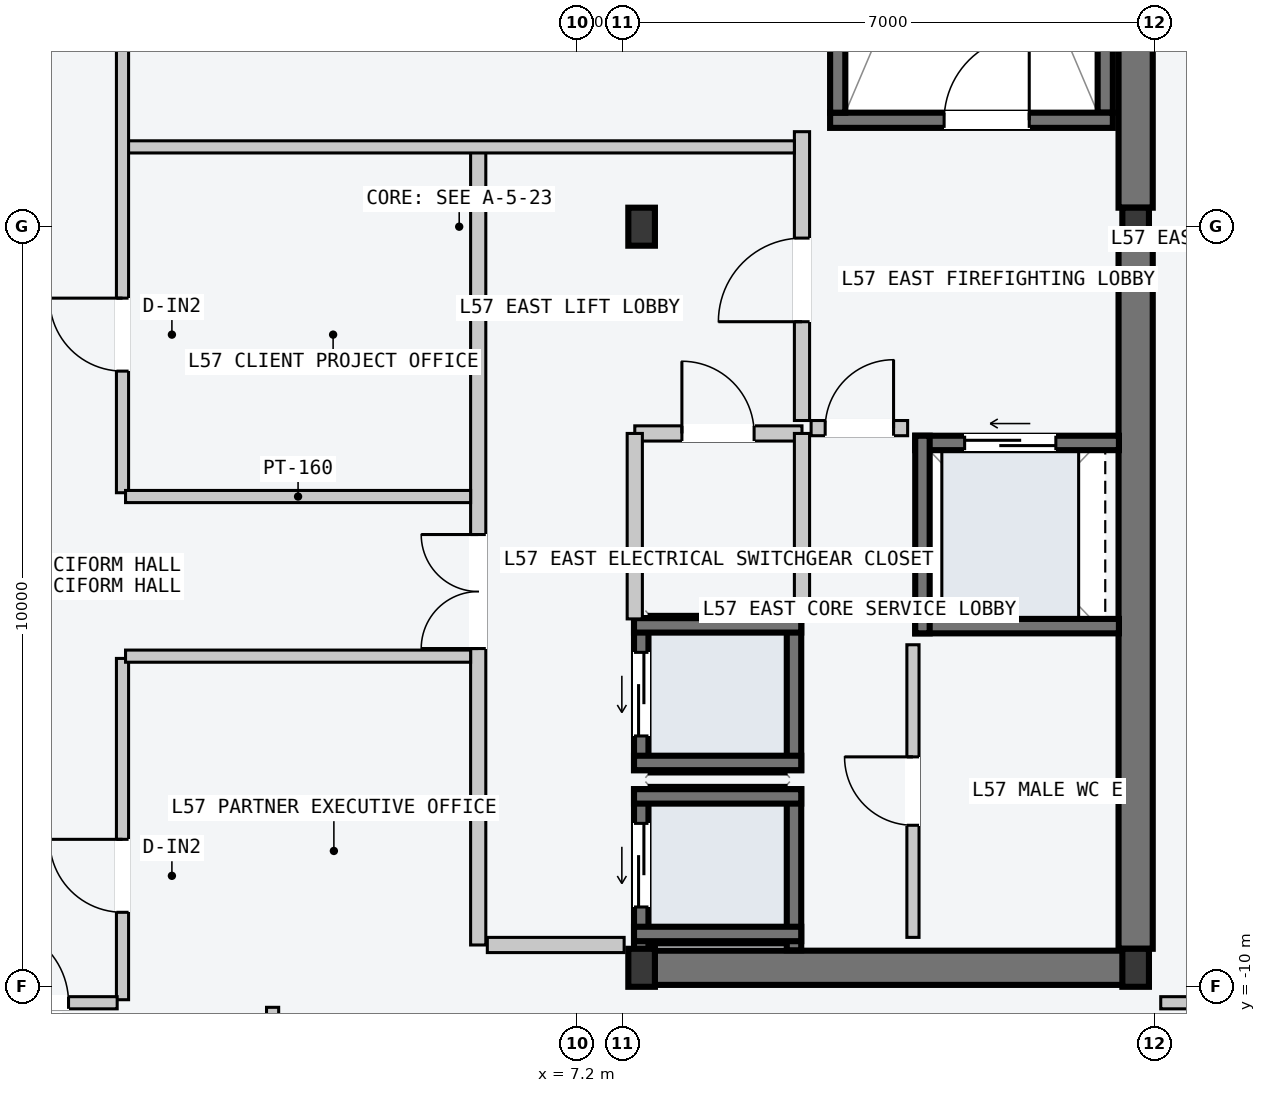
"""IFC4 building model, lengths in metres.
Left out: names, types, materials, properties, quantities, classifications, styles, units other than length and angle.
Written with IfcOpenShell. Run it as: python <this file> out.ifc"""

import sys

from ifc_helpers import new_model, si_unit, direction, frame, frame_2d, origin, origin_2d, place, context, subcontext, project, spatial, rectangle, i_section, extrude, element, fill, save


model = new_model("IFC4")
c1 = context("Model", 3, precision=1e-05, world=origin(), true_north=direction((0.0, 1.0)))
c2 = subcontext(c1, "Body", "Model", "MODEL_VIEW")
j1 = project(units=[si_unit("LENGTHUNIT", "METRE"), si_unit("PLANEANGLEUNIT", "RADIAN")], contexts=[c1])
p1 = place(None, origin())
s1 = spatial("IfcSite", under=j1, at=p1, CompositionType="ELEMENT")
p2 = place(p1, origin())
s2 = spatial("IfcBuilding", under=s1, at=p2, CompositionType="ELEMENT")
p3 = place(p2, frame((0.0, 0.0, 218.4)))
s3 = spatial("IfcBuildingStorey", under=s2, at=p3, CompositionType="ELEMENT", Elevation=218.4)
p4 = place(p3, frame((8.07, -9.75, -0.2), z_axis=(0.0, 0.0, 1.0), x_axis=(1.0, 0.0, 0.0)))
e1 = element("IfcWall", 1, at=p4, inside=s3, PredefinedType="SHEAR", context=c2, shape_type="SweptSolid", body=[
    extrude(rectangle(XDim=6.46, YDim=0.45, at=frame_2d((3.23, 0.0))), origin(), (0.0, 0.0, 1.0), 3.6),
])
for number, where, z_axis, x_axis in (
    (2, (14.55, -9.5, -0.2), (0.0, 0.0, 1.0), (0.0, 1.0, 0.0)),
    (3, (14.55, 0.25, -0.2), (0.0, 0.0, 1.0), (0.0, 1.0, 0.0)),
):
    element("IfcWall", number, at=place(p3, frame(where, z_axis=z_axis, x_axis=x_axis)), inside=s3, PredefinedType="SHEAR", context=c2, shape_type="SweptSolid", body=[
        extrude(rectangle(XDim=9.25, YDim=0.45, at=frame_2d((4.625, 0.0))), origin(), (0.0, 0.0, 1.0), 3.6),
    ])
p5 = place(p3, frame((14.15, 1.5, -0.2), z_axis=(0.0, 0.0, 1.0), x_axis=(0.0, 1.0, 0.0)))
e4 = element("IfcWall", 4, at=p5, inside=s3, PredefinedType="SOLIDWALL", context=c2, shape_type="SweptSolid", body=[
    extrude(rectangle(XDim=7.8, YDim=0.2, at=frame_2d((3.9, 0.0))), origin(), (0.0, 0.0, 1.0), 3.6),
])
p6 = place(p3, frame((10.53, 1.4, -0.2), z_axis=(0.0, 0.0, 1.0), x_axis=(1.0, 0.0, 0.0)))
e5 = element("IfcWall", 5, at=p6, inside=s3, PredefinedType="SOLIDWALL", context=c2, shape_type="SweptSolid", body=[
    extrude(rectangle(XDim=3.72, YDim=0.2, at=frame_2d((1.86, 0.0))), origin(), (0.0, 0.0, 1.0), 3.6),
])
p7 = place(p6, frame((1.5, 0.0, 0.2)))
e6 = element("IfcOpeningElement", 6, at=p7, cuts=e5, PredefinedType="OPENING", context=c2, shape_type="SweptSolid", body=[
    extrude(rectangle(XDim=1.12, YDim=2.18, at=frame_2d((0.56, 1.09))), frame((0.0, 0.11, 0.0), z_axis=(0.0, -1.0, 0.0), x_axis=(1.0, 0.0, 0.0)), (0.0, 0.0, 1.0), 0.22),
])
p8 = place(p3, frame((10.63, 1.5, -0.2), z_axis=(0.0, 0.0, 1.0), x_axis=(0.0, 1.0, 0.0)))
e7 = element("IfcWall", 7, at=p8, inside=s3, PredefinedType="SOLIDWALL", context=c2, shape_type="SweptSolid", body=[
    extrude(rectangle(XDim=7.8, YDim=0.2, at=frame_2d((3.9, 0.0))), origin(), (0.0, 0.0, 1.0), 3.6),
])
for number, where, z_axis, x_axis in (
    (8, (8.05, -9.75, 0.0), (0.0, 0.0, 1.0), (1.0, 0.0, 0.0)),
    (9, (8.05, 0.0, 0.0), (0.0, 0.0, 1.0), (1.0, 0.0, 0.0)),
    (10, (14.55, -9.75, 0.0), (0.0, 0.0, 1.0), (1.0, 0.0, 0.0)),
    (11, (14.55, 0.0, 0.0), (0.0, 0.0, 1.0), (1.0, 0.0, 0.0)),
):
    element("IfcColumn", number, at=place(p3, frame(where, z_axis=z_axis, x_axis=x_axis)), inside=s3, PredefinedType="COLUMN", context=c2, shape_type="SweptSolid", body=[
        extrude(i_section(OverallWidth=0.35, OverallDepth=0.5, WebThickness=0.02, FlangeThickness=0.032, at=origin_2d()), origin(), (0.0, 0.0, 1.0), 3.6),
    ])
p9 = place(p3, frame((8.045, -9.52, -0.2), z_axis=(0.0, 0.0, 1.0), x_axis=(0.0, 1.0, 0.0)))
e12 = element("IfcWall", 12, at=p9, inside=s3, PredefinedType="SOLIDWALL", context=c2, shape_type="SweptSolid", body=[
    extrude(rectangle(XDim=2.12, YDim=0.19, at=frame_2d((1.06, 0.0))), origin(), (0.0, 0.0, 1.0), 3.6),
])
p10 = place(p9, frame((0.57, 0.0, 0.2)))
e13 = element("IfcOpeningElement", 13, at=p10, cuts=e12, PredefinedType="OPENING", context=c2, shape_type="SweptSolid", body=[
    extrude(rectangle(XDim=1.1, YDim=2.2, at=frame_2d((0.55, 1.1))), frame((0.0, 0.105, 0.0), z_axis=(0.0, -1.0, 0.0), x_axis=(1.0, 0.0, 0.0)), (0.0, 0.0, 1.0), 0.21),
])
p11 = place(p3, frame((10.055, -9.52, -0.2), z_axis=(0.0, 0.0, 1.0), x_axis=(0.0, 1.0, 0.0)))
e14 = element("IfcWall", 14, at=p11, inside=s3, PredefinedType="SOLIDWALL", context=c2, shape_type="SweptSolid", body=[
    extrude(rectangle(XDim=2.12, YDim=0.19, at=frame_2d((1.06, 0.0))), origin(), (0.0, 0.0, 1.0), 3.6),
])
for number, where, z_axis, x_axis in (
    (15, (7.95, -7.495, -0.2), (0.0, 0.0, 1.0), (1.0, 0.0, 0.0)),
    (16, (7.95, -9.305, -0.2), (0.0, 0.0, 1.0), (1.0, 0.0, 0.0)),
):
    element("IfcWall", number, at=place(p3, frame(where, z_axis=z_axis, x_axis=x_axis)), inside=s3, PredefinedType="SOLIDWALL", context=c2, shape_type="SweptSolid", body=[
        extrude(rectangle(XDim=2.2, YDim=0.19, at=frame_2d((1.1, 0.0))), origin(), (0.0, 0.0, 1.0), 3.6),
    ])
p12 = place(p3, frame((8.045, -7.15, -0.2), z_axis=(0.0, 0.0, 1.0), x_axis=(0.0, 1.0, 0.0)))
e17 = element("IfcWall", 17, at=p12, inside=s3, PredefinedType="SOLIDWALL", context=c2, shape_type="SweptSolid", body=[
    extrude(rectangle(XDim=2.0, YDim=0.19, at=frame_2d((1.0, 0.0))), origin(), (0.0, 0.0, 1.0), 3.6),
])
p13 = place(p12, frame((0.45, 0.0, 0.2)))
e18 = element("IfcOpeningElement", 18, at=p13, cuts=e17, PredefinedType="OPENING", context=c2, shape_type="SweptSolid", body=[
    extrude(rectangle(XDim=1.1, YDim=2.2, at=frame_2d((0.55, 1.1))), frame((0.0, 0.105, 0.0), z_axis=(0.0, -1.0, 0.0), x_axis=(1.0, 0.0, 0.0)), (0.0, 0.0, 1.0), 0.21),
])
p14 = place(p3, frame((10.055, -7.15, -0.2), z_axis=(0.0, 0.0, 1.0), x_axis=(0.0, 1.0, 0.0)))
e19 = element("IfcWall", 19, at=p14, inside=s3, PredefinedType="SOLIDWALL", context=c2, shape_type="SweptSolid", body=[
    extrude(rectangle(XDim=2.0, YDim=0.19, at=frame_2d((1.0, 0.0))), origin(), (0.0, 0.0, 1.0), 3.6),
])
for number, where, z_axis, x_axis in (
    (20, (7.95, -5.245, -0.2), (0.0, 0.0, 1.0), (1.0, 0.0, 0.0)),
    (21, (7.95, -7.055, -0.2), (0.0, 0.0, 1.0), (1.0, 0.0, 0.0)),
):
    element("IfcWall", number, at=place(p3, frame(where, z_axis=z_axis, x_axis=x_axis)), inside=s3, PredefinedType="SOLIDWALL", context=c2, shape_type="SweptSolid", body=[
        extrude(rectangle(XDim=2.2, YDim=0.19, at=frame_2d((1.1, 0.0))), origin(), (0.0, 0.0, 1.0), 3.6),
    ])
p15 = place(p3, frame((11.65, -2.845, -0.2), z_axis=(0.0, 0.0, 1.0), x_axis=(1.0, 0.0, 0.0)))
e22 = element("IfcWall", 22, at=p15, inside=s3, PredefinedType="SOLIDWALL", context=c2, shape_type="SweptSolid", body=[
    extrude(rectangle(XDim=2.68, YDim=0.19, at=frame_2d((1.34, 0.0))), origin(), (0.0, 0.0, 1.0), 3.6),
])
p16 = place(p15, frame((0.65, 0.0, 0.2)))
e23 = element("IfcOpeningElement", 23, at=p16, cuts=e22, PredefinedType="OPENING", context=c2, shape_type="SweptSolid", body=[
    extrude(rectangle(XDim=1.2, YDim=2.2, at=frame_2d((0.6, 1.1))), frame((0.0, 0.105, 0.0), z_axis=(0.0, -1.0, 0.0), x_axis=(1.0, 0.0, 0.0)), (0.0, 0.0, 1.0), 0.21),
])
p17 = place(p3, frame((11.65, -5.255, -0.2), z_axis=(0.0, 0.0, 1.0), x_axis=(1.0, 0.0, 0.0)))
e24 = element("IfcWall", 24, at=p17, inside=s3, PredefinedType="SOLIDWALL", context=c2, shape_type="SweptSolid", body=[
    extrude(rectangle(XDim=2.68, YDim=0.19, at=frame_2d((1.34, 0.0))), origin(), (0.0, 0.0, 1.0), 3.6),
])
p18 = place(p3, frame((11.745, -5.35, -0.2), z_axis=(0.0, 0.0, 1.0), x_axis=(0.0, 1.0, 0.0)))
e25 = element("IfcWall", 25, at=p18, inside=s3, PredefinedType="SOLIDWALL", context=c2, shape_type="SweptSolid", body=[
    extrude(rectangle(XDim=2.6, YDim=0.19, at=frame_2d((1.3, 0.0))), origin(), (0.0, 0.0, 1.0), 3.6),
])
p19 = place(p3, frame((5.9, -9.45, 0.0), z_axis=(0.0, 0.0, 1.0), x_axis=(0.0, 1.0, 0.0)))
e26 = element("IfcWall", 26, at=p19, inside=s3, PredefinedType="PARTITIONING", context=c2, shape_type="SweptSolid", body=[
    extrude(rectangle(XDim=10.5, YDim=0.2, at=frame_2d((5.25, 0.0))), origin(), (0.0, 0.0, 1.0), 3.4),
])
p20 = place(p19, frame((3.9, 0.0, 0.0)))
e27 = element("IfcOpeningElement", 27, at=p20, cuts=e26, PredefinedType="OPENING", context=c2, shape_type="SweptSolid", body=[
    extrude(rectangle(XDim=1.5, YDim=2.2, at=frame_2d((0.75, 1.1))), frame((0.0, 0.11, 0.0), z_axis=(0.0, -1.0, 0.0), x_axis=(1.0, 0.0, 0.0)), (0.0, 0.0, 1.0), 0.22),
])
p21 = place(p3, frame((6.02, -9.45, 0.0), z_axis=(0.0, 0.0, 1.0), x_axis=(1.0, 0.0, 0.0)))
e28 = element("IfcWall", 28, at=p21, inside=s3, PredefinedType="PARTITIONING", context=c2, shape_type="SweptSolid", body=[
    extrude(rectangle(XDim=1.8, YDim=0.2, at=frame_2d((0.9, 0.0))), origin(), (0.0, 0.0, 1.0), 3.4),
])
p22 = place(p3, frame((10.16, -2.55, 0.0), z_axis=(0.0, 0.0, 1.0), x_axis=(0.0, 1.0, 0.0)))
e29 = element("IfcWall", 29, at=p22, inside=s3, PredefinedType="PARTITIONING", context=c2, shape_type="SweptSolid", body=[
    extrude(rectangle(XDim=3.8, YDim=0.2, at=frame_2d((1.9, 0.0))), origin(), (0.0, 0.0, 1.0), 3.4),
])
p23 = place(p22, frame((1.3, 0.0, 0.0)))
e30 = element("IfcOpeningElement", 30, at=p23, cuts=e29, PredefinedType="OPENING", context=c2, shape_type="SweptSolid", body=[
    extrude(rectangle(XDim=1.1, YDim=2.15, at=frame_2d((0.55, 1.075))), frame((0.0, 0.11, 0.0), z_axis=(0.0, -1.0, 0.0), x_axis=(1.0, 0.0, 0.0)), (0.0, 0.0, 1.0), 0.22),
])
p24 = place(p3, frame((10.28, -2.65, 0.0), z_axis=(0.0, 0.0, 1.0), x_axis=(1.0, 0.0, 0.0)))
e31 = element("IfcWall", 31, at=p24, inside=s3, PredefinedType="PARTITIONING", context=c2, shape_type="SweptSolid", body=[
    extrude(rectangle(XDim=1.27, YDim=0.2, at=frame_2d((0.635, 0.0))), origin(), (0.0, 0.0, 1.0), 3.4),
])
p25 = place(p24, frame((0.185, 0.0, 0.0)))
e32 = element("IfcOpeningElement", 32, at=p25, cuts=e31, PredefinedType="OPENING", context=c2, shape_type="SweptSolid", body=[
    extrude(rectangle(XDim=0.9, YDim=2.15, at=frame_2d((0.45, 1.075))), frame((0.0, 0.11, 0.0), z_axis=(0.0, -1.0, 0.0), x_axis=(1.0, 0.0, 0.0)), (0.0, 0.0, 1.0), 0.22),
])
p26 = place(p3, frame((7.96, -2.72, 0.0), z_axis=(0.0, 0.0, 1.0), x_axis=(1.0, 0.0, 0.0)))
e33 = element("IfcWall", 33, at=p26, inside=s3, PredefinedType="PARTITIONING", context=c2, shape_type="SweptSolid", body=[
    extrude(rectangle(XDim=2.2, YDim=0.2, at=frame_2d((1.1, 0.0))), origin(), (0.0, 0.0, 1.0), 3.4),
])
p27 = place(p26, frame((0.62, 0.0, 0.0)))
e34 = element("IfcOpeningElement", 34, at=p27, cuts=e33, PredefinedType="OPENING", context=c2, shape_type="SweptSolid", body=[
    extrude(rectangle(XDim=0.95, YDim=2.1, at=frame_2d((0.475, 1.05))), frame((0.0, 0.11, 0.0), z_axis=(0.0, -1.0, 0.0), x_axis=(1.0, 0.0, 0.0)), (0.0, 0.0, 1.0), 0.22),
])
for number, where, z_axis, x_axis in (
    (35, (7.96, -5.16, 0.0), (0.0, 0.0, 1.0), (0.0, 1.0, 0.0)),
    (36, (10.16, -5.16, 0.0), (0.0, 0.0, 1.0), (0.0, 1.0, 0.0)),
):
    element("IfcWall", number, at=place(p3, frame(where, z_axis=z_axis, x_axis=x_axis)), inside=s3, PredefinedType="PARTITIONING", context=c2, shape_type="SweptSolid", body=[
        extrude(rectangle(XDim=2.44, YDim=0.2, at=frame_2d((1.22, 0.0))), origin(), (0.0, 0.0, 1.0), 3.4),
    ])
p28 = place(p3, frame((11.62, -9.35, 0.0), z_axis=(0.0, 0.0, 1.0), x_axis=(0.0, 1.0, 0.0)))
e37 = element("IfcWall", 37, at=p28, inside=s3, PredefinedType="PARTITIONING", context=c2, shape_type="SweptSolid", body=[
    extrude(rectangle(XDim=3.85, YDim=0.16, at=frame_2d((1.925, 0.0))), origin(), (0.0, 0.0, 1.0), 3.4),
])
p29 = place(p28, frame((1.475, 0.0, 0.0)))
e38 = element("IfcOpeningElement", 38, at=p29, cuts=e37, PredefinedType="OPENING", context=c2, shape_type="SweptSolid", body=[
    extrude(rectangle(XDim=0.9, YDim=2.15, at=frame_2d((0.45, 1.075))), frame((0.0, 0.09, 0.0), z_axis=(0.0, -1.0, 0.0), x_axis=(1.0, 0.0, 0.0)), (0.0, 0.0, 1.0), 0.18),
])
p30 = place(p3, frame((1.26, 1.05, 0.0), z_axis=(0.0, 0.0, 1.0), x_axis=(1.0, 0.0, 0.0)))
e39 = element("IfcWall", 39, at=p30, inside=s3, PredefinedType="PARTITIONING", context=c2, shape_type="SweptSolid", body=[
    extrude(rectangle(XDim=8.8, YDim=0.16, at=frame_2d((4.4, 0.0))), origin(), (0.0, 0.0, 1.0), 3.4),
])
p31 = place(p3, frame((1.22, -3.5, 0.0), z_axis=(0.0, 0.0, 1.0), x_axis=(0.0, 1.0, 0.0)))
e40 = element("IfcWall", 40, at=p31, inside=s3, PredefinedType="PARTITIONING", context=c2, shape_type="SweptSolid", body=[
    extrude(rectangle(XDim=12.81, YDim=0.16, at=frame_2d((6.405, 0.0))), origin(), (0.0, 0.0, 1.0), 3.4),
])
p32 = place(p31, frame((6.1, 0.0, 0.0)))
e41 = element("IfcOpeningElement", 41, at=p32, cuts=e40, PredefinedType="OPENING", context=c2, shape_type="SweptSolid", body=[
    extrude(rectangle(XDim=1.24, YDim=2.24, at=frame_2d((0.62, 1.12))), frame((0.0, 0.09, 0.0), z_axis=(0.0, -1.0, 0.0), x_axis=(1.0, 0.0, 0.0)), (0.0, 0.0, 1.0), 0.18),
])
p33 = place(p31, frame((1.6, 0.0, 0.0)))
e42 = element("IfcOpeningElement", 42, at=p33, cuts=e40, PredefinedType="OPENING", context=c2, shape_type="SweptSolid", body=[
    extrude(rectangle(XDim=0.96, YDim=2.18, at=frame_2d((0.48, 1.09))), frame((0.0, 0.09, 0.0), z_axis=(0.0, -1.0, 0.0), x_axis=(1.0, 0.0, 0.0)), (0.0, 0.0, 1.0), 0.18),
])
p34 = place(p3, frame((1.26, -3.55, 0.0), z_axis=(0.0, 0.0, 1.0), x_axis=(1.0, 0.0, 0.0)))
e43 = element("IfcWall", 43, at=p34, inside=s3, PredefinedType="PARTITIONING", context=c2, shape_type="SweptSolid", body=[
    extrude(rectangle(XDim=4.54, YDim=0.16, at=frame_2d((2.27, 0.0))), origin(), (0.0, 0.0, 1.0), 3.4),
])
p35 = place(p3, frame((1.22, -10.17, 0.0), z_axis=(0.0, 0.0, 1.0), x_axis=(0.0, 1.0, 0.0)))
e44 = element("IfcWall", 44, at=p35, inside=s3, PredefinedType="PARTITIONING", context=c2, shape_type="SweptSolid", body=[
    extrude(rectangle(XDim=4.49, YDim=0.16, at=frame_2d((2.245, 0.0))), origin(), (0.0, 0.0, 1.0), 3.4),
])
p36 = place(p35, frame((1.15, 0.0, 0.0)))
e45 = element("IfcOpeningElement", 45, at=p36, cuts=e44, PredefinedType="OPENING", context=c2, shape_type="SweptSolid", body=[
    extrude(rectangle(XDim=0.96, YDim=2.18, at=frame_2d((0.48, 1.09))), frame((0.0, 0.09, 0.0), z_axis=(0.0, -1.0, 0.0), x_axis=(1.0, 0.0, 0.0)), (0.0, 0.0, 1.0), 0.18),
])
p37 = place(p3, frame((1.26, -5.65, 0.0), z_axis=(0.0, 0.0, 1.0), x_axis=(1.0, 0.0, 0.0)))
e46 = element("IfcWall", 46, at=p37, inside=s3, PredefinedType="PARTITIONING", context=c2, shape_type="SweptSolid", body=[
    extrude(rectangle(XDim=4.54, YDim=0.16, at=frame_2d((2.27, 0.0))), origin(), (0.0, 0.0, 1.0), 3.4),
])
p38 = place(p3, frame((3.195, -17.56, 0.0), z_axis=(0.0, 0.0, 1.0), x_axis=(0.0, 1.0, 0.0)))
e47 = element("IfcWall", 47, at=p38, inside=s3, PredefinedType="PARTITIONING", context=c2, shape_type="SweptSolid", body=[
    extrude(rectangle(XDim=7.29, YDim=0.16, at=frame_2d((3.645, 0.0))), origin(), (0.0, 0.0, 1.0), 3.4),
])
p39 = place(p38, frame((1.05, 0.0, 0.0)))
e48 = element("IfcOpeningElement", 48, at=p39, cuts=e47, PredefinedType="OPENING", context=c2, shape_type="SweptSolid", body=[
    extrude(rectangle(XDim=0.96, YDim=2.18, at=frame_2d((0.48, 1.09))), frame((0.0, 0.09, 0.0), z_axis=(0.0, -1.0, 0.0), x_axis=(1.0, 0.0, 0.0)), (0.0, 0.0, 1.0), 0.18),
])
p40 = place(p3, frame((-1.15, -10.21, 0.0), z_axis=(0.0, 0.0, 1.0), x_axis=(1.0, 0.0, 0.0)))
e49 = element("IfcWall", 49, at=p40, inside=s3, PredefinedType="PARTITIONING", context=c2, shape_type="SweptSolid", body=[
    extrude(rectangle(XDim=2.3, YDim=0.16, at=frame_2d((1.15, 0.0))), origin(), (0.0, 0.0, 1.0), 3.4),
])
p41 = place(p40, frame((0.64, 0.0, 0.0)))
e50 = element("IfcOpeningElement", 50, at=p41, cuts=e49, PredefinedType="OPENING", context=c2, shape_type="SweptSolid", body=[
    extrude(rectangle(XDim=1.02, YDim=2.2, at=frame_2d((0.51, 1.1))), frame((0.0, 0.09, 0.0), z_axis=(0.0, -1.0, 0.0), x_axis=(1.0, 0.0, 0.0)), (0.0, 0.0, 1.0), 0.18),
])
p42 = place(p3, frame((14.88, -10.21, 0.0), z_axis=(0.0, 0.0, 1.0), x_axis=(1.0, 0.0, 0.0)))
e51 = element("IfcWall", 51, at=p42, inside=s3, PredefinedType="PARTITIONING", context=c2, shape_type="SweptSolid", body=[
    extrude(rectangle(XDim=3.68, YDim=0.16, at=frame_2d((1.84, 0.0))), origin(), (0.0, 0.0, 1.0), 3.4),
])
p43 = place(p42, frame((1.36, 0.0, 0.0)))
e52 = element("IfcOpeningElement", 52, at=p43, cuts=e51, PredefinedType="OPENING", context=c2, shape_type="SweptSolid", body=[
    extrude(rectangle(XDim=0.96, YDim=2.18, at=frame_2d((0.48, 1.09))), frame((0.0, 0.09, 0.0), z_axis=(0.0, -1.0, 0.0), x_axis=(1.0, 0.0, 0.0)), (0.0, 0.0, 1.0), 0.18),
])
p44 = place(p7, origin())
e53 = element("IfcDoor", 53, at=p44, inside=s3, OperationType="SINGLE_SWING_RIGHT", PredefinedType="DOOR", context=c2, shape_type="SweptSolid", body=[
    extrude(rectangle(XDim=1.12, YDim=2.18, at=frame_2d((0.56, 1.09))), frame((0.0, 0.025, 0.0), z_axis=(0.0, -1.0, 0.0), x_axis=(1.0, 0.0, 0.0)), (0.0, 0.0, 1.0), 0.05),
])
fill(e6, e53)
p45 = place(p10, origin())
e54 = element("IfcDoor", 54, at=p45, inside=s3, OperationType="SLIDING_TO_LEFT", PredefinedType="DOOR", context=c2, shape_type="SweptSolid", body=[
    extrude(rectangle(XDim=1.1, YDim=2.2, at=frame_2d((0.55, 1.1))), frame((0.0, 0.025, 0.0), z_axis=(0.0, -1.0, 0.0), x_axis=(1.0, 0.0, 0.0)), (0.0, 0.0, 1.0), 0.05),
])
fill(e13, e54)
p46 = place(p13, origin())
e55 = element("IfcDoor", 55, at=p46, inside=s3, OperationType="SLIDING_TO_LEFT", PredefinedType="DOOR", context=c2, shape_type="SweptSolid", body=[
    extrude(rectangle(XDim=1.1, YDim=2.2, at=frame_2d((0.55, 1.1))), frame((0.0, 0.025, 0.0), z_axis=(0.0, -1.0, 0.0), x_axis=(1.0, 0.0, 0.0)), (0.0, 0.0, 1.0), 0.05),
])
fill(e18, e55)
p47 = place(p16, origin())
e56 = element("IfcDoor", 56, at=p47, inside=s3, OperationType="SLIDING_TO_LEFT", PredefinedType="DOOR", context=c2, shape_type="SweptSolid", body=[
    extrude(rectangle(XDim=1.2, YDim=2.2, at=frame_2d((0.6, 1.1))), frame((0.0, 0.025, 0.0), z_axis=(0.0, -1.0, 0.0), x_axis=(1.0, 0.0, 0.0)), (0.0, 0.0, 1.0), 0.05),
])
fill(e23, e56)
p48 = place(p20, origin())
e57 = element("IfcDoor", 57, at=p48, inside=s3, OperationType="DOUBLE_DOOR_SINGLE_SWING", PredefinedType="DOOR", context=c2, shape_type="SweptSolid", body=[
    extrude(rectangle(XDim=1.5, YDim=2.2, at=frame_2d((0.75, 1.1))), frame((0.0, 0.025, 0.0), z_axis=(0.0, -1.0, 0.0), x_axis=(1.0, 0.0, 0.0)), (0.0, 0.0, 1.0), 0.05),
])
fill(e27, e57)
p49 = place(p23, origin())
e58 = element("IfcDoor", 58, at=p49, inside=s3, OperationType="SINGLE_SWING_LEFT", PredefinedType="DOOR", context=c2, shape_type="SweptSolid", body=[
    extrude(rectangle(XDim=1.1, YDim=2.15, at=frame_2d((0.55, 1.075))), frame((0.0, 0.025, 0.0), z_axis=(0.0, -1.0, 0.0), x_axis=(1.0, 0.0, 0.0)), (0.0, 0.0, 1.0), 0.05),
])
fill(e30, e58)
p50 = place(p25, origin())
e59 = element("IfcDoor", 59, at=p50, inside=s3, OperationType="SINGLE_SWING_RIGHT", PredefinedType="DOOR", context=c2, shape_type="SweptSolid", body=[
    extrude(rectangle(XDim=0.9, YDim=2.15, at=frame_2d((0.45, 1.075))), frame((0.0, 0.025, 0.0), z_axis=(0.0, -1.0, 0.0), x_axis=(1.0, 0.0, 0.0)), (0.0, 0.0, 1.0), 0.05),
])
fill(e32, e59)
p51 = place(p27, origin())
e60 = element("IfcDoor", 60, at=p51, inside=s3, OperationType="SINGLE_SWING_LEFT", PredefinedType="DOOR", context=c2, shape_type="SweptSolid", body=[
    extrude(rectangle(XDim=0.95, YDim=2.1, at=frame_2d((0.475, 1.05))), frame((0.0, 0.025, 0.0), z_axis=(0.0, -1.0, 0.0), x_axis=(1.0, 0.0, 0.0)), (0.0, 0.0, 1.0), 0.05),
])
fill(e34, e60)
p52 = place(p29, origin())
e61 = element("IfcDoor", 61, at=p52, inside=s3, OperationType="SINGLE_SWING_RIGHT", PredefinedType="DOOR", context=c2, shape_type="SweptSolid", body=[
    extrude(rectangle(XDim=0.9, YDim=2.15, at=frame_2d((0.45, 1.075))), frame((0.0, 0.025, 0.0), z_axis=(0.0, -1.0, 0.0), x_axis=(1.0, 0.0, 0.0)), (0.0, 0.0, 1.0), 0.05),
])
fill(e38, e61)
p53 = place(p33, origin())
e62 = element("IfcDoor", 62, at=p53, inside=s3, OperationType="SINGLE_SWING_RIGHT", PredefinedType="DOOR", context=c2, shape_type="SweptSolid", body=[
    extrude(rectangle(XDim=0.96, YDim=2.18, at=frame_2d((0.48, 1.09))), frame((0.0, 0.025, 0.0), z_axis=(0.0, -1.0, 0.0), x_axis=(1.0, 0.0, 0.0)), (0.0, 0.0, 1.0), 0.05),
])
fill(e42, e62)
p54 = place(p36, origin())
e63 = element("IfcDoor", 63, at=p54, inside=s3, OperationType="SINGLE_SWING_RIGHT", PredefinedType="DOOR", context=c2, shape_type="SweptSolid", body=[
    extrude(rectangle(XDim=0.96, YDim=2.18, at=frame_2d((0.48, 1.09))), frame((0.0, 0.025, 0.0), z_axis=(0.0, -1.0, 0.0), x_axis=(1.0, 0.0, 0.0)), (0.0, 0.0, 1.0), 0.05),
])
fill(e45, e63)
p55 = place(p41, origin())
e64 = element("IfcDoor", 64, at=p55, inside=s3, OperationType="SINGLE_SWING_LEFT", PredefinedType="DOOR", context=c2, shape_type="SweptSolid", body=[
    extrude(rectangle(XDim=1.02, YDim=2.2, at=frame_2d((0.51, 1.1))), frame((0.0, 0.025, 0.0), z_axis=(0.0, -1.0, 0.0), x_axis=(1.0, 0.0, 0.0)), (0.0, 0.0, 1.0), 0.05),
])
fill(e50, e64)
save(model, sys.argv[1])
